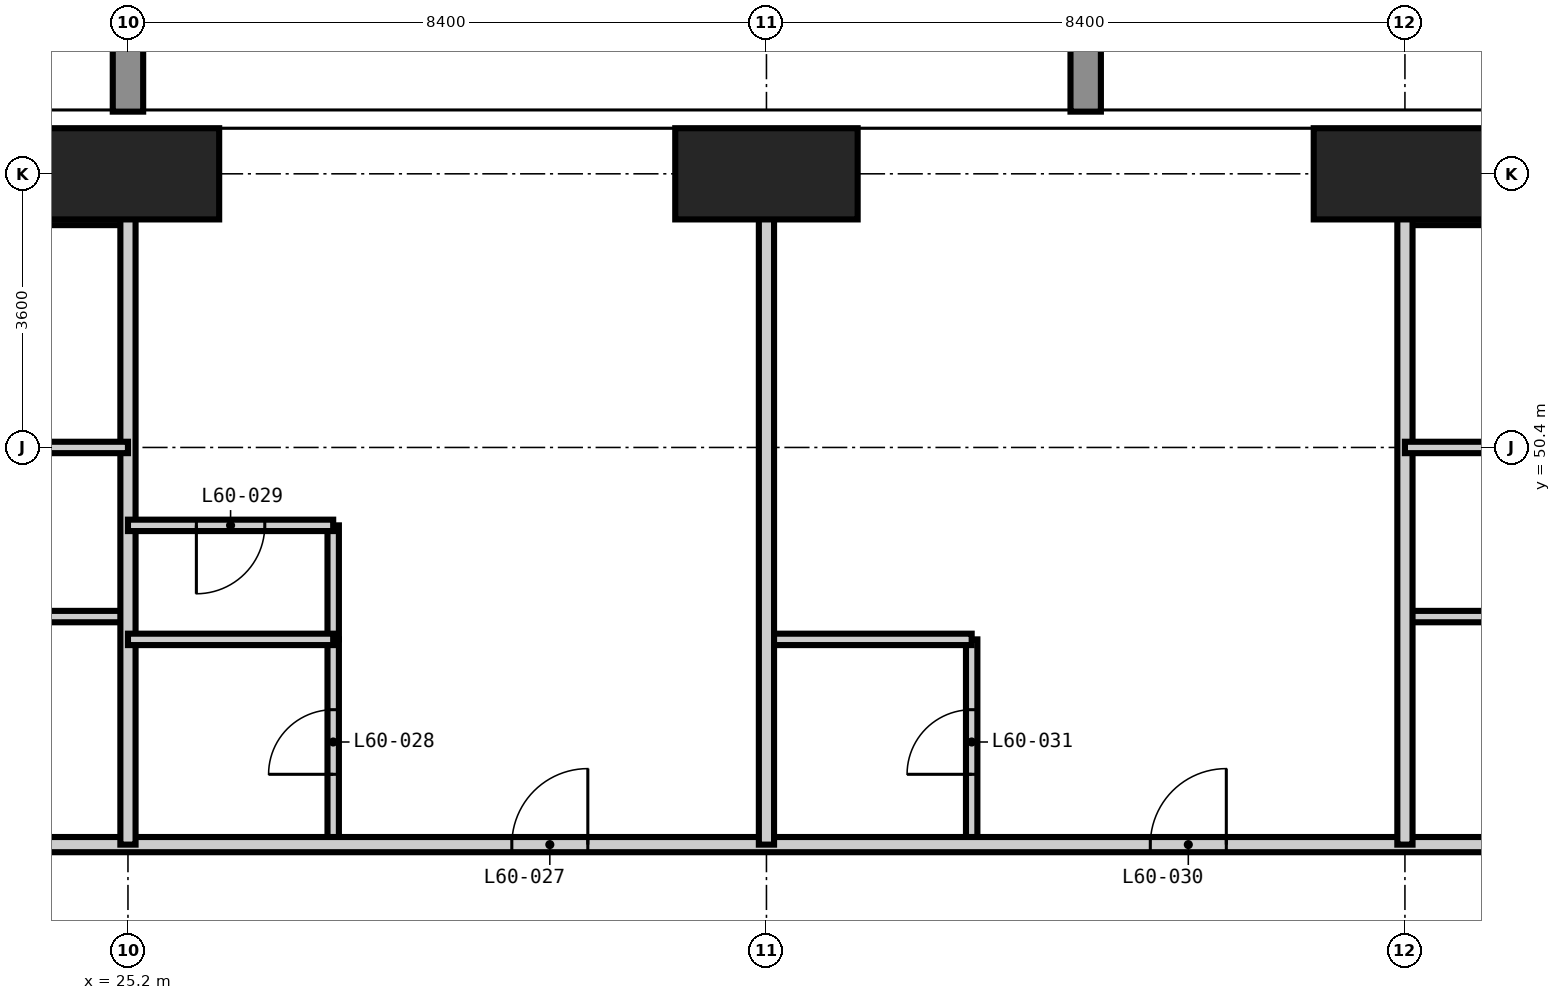
"""IFC4 building model, lengths in metres.
Left out: names, types, materials, properties, quantities, classifications, styles, units other than length and angle.
Written with IfcOpenShell. Run it as: python <this file> out.ifc"""

import sys

from ifc_helpers import new_model, si_unit, direction, frame, frame_2d, origin, origin_2d, place, context, subcontext, project, spatial, rectangle, extrude, element, fill, save


model = new_model("IFC4")
c1 = context("Model", 3, precision=1e-05, world=origin(), true_north=direction((0.0, 1.0)))
c2 = subcontext(c1, "Body", "Model", "MODEL_VIEW")
j1 = project(units=[si_unit("LENGTHUNIT", "METRE"), si_unit("PLANEANGLEUNIT", "RADIAN")], contexts=[c1])
p1 = place(None, origin())
s1 = spatial("IfcSite", under=j1, at=p1, CompositionType="ELEMENT")
p2 = place(p1, origin())
s2 = spatial("IfcBuilding", under=s1, at=p2, CompositionType="ELEMENT")
p3 = place(p2, frame((0.0, 0.0, 233.4)))
s3 = spatial("IfcBuildingStorey", under=s2, at=p3, CompositionType="ELEMENT", Elevation=233.4)
for number, where, z_axis, x_axis in (
    (1, (25.2, 54.0, -0.35), (0.0, 0.0, 1.0), (1.0, 0.0, 0.0)),
    (2, (33.6, 54.0, -0.35), (0.0, 0.0, 1.0), (1.0, 0.0, 0.0)),
    (3, (42.0, 54.0, -0.35), (0.0, 0.0, 1.0), (1.0, 0.0, 0.0)),
):
    element("IfcColumn", number, at=place(p3, frame(where, z_axis=z_axis, x_axis=x_axis)), inside=s3, PredefinedType="COLUMN", context=c2, shape_type="SweptSolid", body=[
        extrude(rectangle(XDim=2.4, YDim=1.2, at=origin_2d()), origin(), (0.0, 0.0, 1.0), 3.9),
    ])
p4 = place(p3, frame((27.9, 45.175, 0.0), z_axis=(0.0, 0.0, 1.0), x_axis=(0.0, 1.0, 0.0)))
e4 = element("IfcWall", 4, at=p4, inside=s3, PredefinedType="PARTITIONING", context=c2, shape_type="SweptSolid", body=[
    extrude(rectangle(XDim=2.7, YDim=0.15, at=frame_2d((1.35, 0.0))), origin(), (0.0, 0.0, 1.0), 3.55),
])
p5 = place(p4, frame((0.925, 0.0, 0.0)))
e5 = element("IfcOpeningElement", 5, at=p5, cuts=e4, PredefinedType="OPENING", context=c2, shape_type="SweptSolid", body=[
    extrude(rectangle(XDim=0.85, YDim=2.1, at=frame_2d((0.425, 1.05))), frame((0.0, 0.085, 0.0), z_axis=(0.0, -1.0, 0.0), x_axis=(1.0, 0.0, 0.0)), (0.0, 0.0, 1.0), 0.17),
])
p6 = place(p3, frame((36.3, 45.175, 0.0), z_axis=(0.0, 0.0, 1.0), x_axis=(0.0, 1.0, 0.0)))
e6 = element("IfcWall", 6, at=p6, inside=s3, PredefinedType="PARTITIONING", context=c2, shape_type="SweptSolid", body=[
    extrude(rectangle(XDim=2.7, YDim=0.15, at=frame_2d((1.35, 0.0))), origin(), (0.0, 0.0, 1.0), 3.55),
])
p7 = place(p6, frame((0.925, 0.0, 0.0)))
e7 = element("IfcOpeningElement", 7, at=p7, cuts=e6, PredefinedType="OPENING", context=c2, shape_type="SweptSolid", body=[
    extrude(rectangle(XDim=0.85, YDim=2.1, at=frame_2d((0.425, 1.05))), frame((0.0, 0.085, 0.0), z_axis=(0.0, -1.0, 0.0), x_axis=(1.0, 0.0, 0.0)), (0.0, 0.0, 1.0), 0.17),
])
p8 = place(p3, frame((33.6, 47.875, 0.0), z_axis=(0.0, 0.0, 1.0), x_axis=(1.0, 0.0, 0.0)))
e8 = element("IfcWall", 8, at=p8, inside=s3, PredefinedType="PARTITIONING", context=c2, shape_type="SweptSolid", body=[
    extrude(rectangle(XDim=2.7, YDim=0.15, at=frame_2d((1.35, 0.0))), origin(), (0.0, 0.0, 1.0), 3.55),
])
p9 = place(p3, frame((22.625, 48.175, 0.0), z_axis=(0.0, 0.0, 1.0), x_axis=(1.0, 0.0, 0.0)))
e9 = element("IfcWall", 9, at=p9, inside=s3, PredefinedType="PARTITIONING", context=c2, shape_type="SweptSolid", body=[
    extrude(rectangle(XDim=2.575, YDim=0.15, at=frame_2d((1.288, 0.0))), origin(), (0.0, 0.0, 1.0), 3.55),
])
p10 = place(p3, frame((42.0, 48.175, 0.0), z_axis=(0.0, 0.0, 1.0), x_axis=(1.0, 0.0, 0.0)))
e10 = element("IfcWall", 10, at=p10, inside=s3, PredefinedType="PARTITIONING", context=c2, shape_type="SweptSolid", body=[
    extrude(rectangle(XDim=2.875, YDim=0.15, at=frame_2d((1.438, 0.0))), origin(), (0.0, 0.0, 1.0), 3.55),
])
p11 = place(p3, frame((21.6, 53.4, 0.0), z_axis=(0.0, 0.0, 1.0), x_axis=(1.0, 0.0, 0.0)))
e11 = element("IfcWall", 11, at=p11, inside=s3, PredefinedType="PARTITIONING", context=c2, shape_type="SweptSolid", body=[
    extrude(rectangle(XDim=3.6, YDim=0.15, at=frame_2d((1.8, 0.0))), origin(), (0.0, 0.0, 1.0), 3.55),
])
p12 = place(p11, frame((1.375, 0.0, 0.0)))
e12 = element("IfcOpeningElement", 12, at=p12, cuts=e11, PredefinedType="OPENING", context=c2, shape_type="SweptSolid", body=[
    extrude(rectangle(XDim=0.85, YDim=2.1, at=frame_2d((0.425, 1.05))), frame((0.0, 0.085, 0.0), z_axis=(0.0, -1.0, 0.0), x_axis=(1.0, 0.0, 0.0)), (0.0, 0.0, 1.0), 0.17),
])
p13 = place(p3, frame((42.0, 53.4, 0.0), z_axis=(0.0, 0.0, 1.0), x_axis=(1.0, 0.0, 0.0)))
e13 = element("IfcWall", 13, at=p13, inside=s3, PredefinedType="PARTITIONING", context=c2, shape_type="SweptSolid", body=[
    extrude(rectangle(XDim=3.6, YDim=0.15, at=frame_2d((1.8, 0.0))), origin(), (0.0, 0.0, 1.0), 3.55),
])
p14 = place(p13, frame((1.375, 0.0, 0.0)))
e14 = element("IfcOpeningElement", 14, at=p14, cuts=e13, PredefinedType="OPENING", context=c2, shape_type="SweptSolid", body=[
    extrude(rectangle(XDim=0.85, YDim=2.1, at=frame_2d((0.425, 1.05))), frame((0.0, 0.085, 0.0), z_axis=(0.0, -1.0, 0.0), x_axis=(1.0, 0.0, 0.0)), (0.0, 0.0, 1.0), 0.17),
])
p15 = place(p3, frame((22.625, 45.175, 0.0), z_axis=(0.0, 0.0, 1.0), x_axis=(1.0, 0.0, 0.0)))
e15 = element("IfcWall", 15, at=p15, inside=s3, PredefinedType="PARTITIONING", context=c2, shape_type="SweptSolid", body=[
    extrude(rectangle(XDim=22.25, YDim=0.2, at=frame_2d((11.125, 0.0))), origin(), (0.0, 0.0, 1.0), 3.55),
])
p16 = place(p15, frame((7.625, 0.0, 0.0)))
e16 = element("IfcOpeningElement", 16, at=p16, cuts=e15, PredefinedType="OPENING", context=c2, shape_type="SweptSolid", body=[
    extrude(rectangle(XDim=1.0, YDim=2.2, at=frame_2d((0.5, 1.1))), frame((0.0, 0.11, 0.0), z_axis=(0.0, -1.0, 0.0), x_axis=(1.0, 0.0, 0.0)), (0.0, 0.0, 1.0), 0.22),
])
p17 = place(p15, frame((16.025, 0.0, 0.0)))
e17 = element("IfcOpeningElement", 17, at=p17, cuts=e15, PredefinedType="OPENING", context=c2, shape_type="SweptSolid", body=[
    extrude(rectangle(XDim=1.0, YDim=2.2, at=frame_2d((0.5, 1.1))), frame((0.0, 0.11, 0.0), z_axis=(0.0, -1.0, 0.0), x_axis=(1.0, 0.0, 0.0)), (0.0, 0.0, 1.0), 0.22),
])
for number, where, z_axis, x_axis in (
    (18, (25.2, 45.175, 0.0), (0.0, 0.0, 1.0), (0.0, 1.0, 0.0)),
    (19, (33.6, 45.175, 0.0), (0.0, 0.0, 1.0), (0.0, 1.0, 0.0)),
    (20, (42.0, 45.175, 0.0), (0.0, 0.0, 1.0), (0.0, 1.0, 0.0)),
):
    element("IfcWall", number, at=place(p3, frame(where, z_axis=z_axis, x_axis=x_axis)), inside=s3, PredefinedType="PARTITIONING", context=c2, shape_type="SweptSolid", body=[
        extrude(rectangle(XDim=9.443, YDim=0.2, at=frame_2d((4.721, 0.0))), origin(), (0.0, 0.0, 1.0), 3.55),
    ])
p18 = place(p3, frame((27.9, 47.875, 0.0), z_axis=(0.0, 0.0, 1.0), x_axis=(0.0, 1.0, 0.0)))
e21 = element("IfcWall", 21, at=p18, inside=s3, PredefinedType="PARTITIONING", context=c2, shape_type="SweptSolid", body=[
    extrude(rectangle(XDim=1.5, YDim=0.15, at=frame_2d((0.75, 0.0))), origin(), (0.0, 0.0, 1.0), 3.55),
])
p19 = place(p3, frame((25.2, 47.875, 0.0), z_axis=(0.0, 0.0, 1.0), x_axis=(1.0, 0.0, 0.0)))
e22 = element("IfcWall", 22, at=p19, inside=s3, PredefinedType="PARTITIONING", context=c2, shape_type="SweptSolid", body=[
    extrude(rectangle(XDim=2.7, YDim=0.15, at=frame_2d((1.35, 0.0))), origin(), (0.0, 0.0, 1.0), 3.55),
])
p20 = place(p3, frame((25.2, 49.375, 0.0), z_axis=(0.0, 0.0, 1.0), x_axis=(1.0, 0.0, 0.0)))
e23 = element("IfcWall", 23, at=p20, inside=s3, PredefinedType="PARTITIONING", context=c2, shape_type="SweptSolid", body=[
    extrude(rectangle(XDim=2.7, YDim=0.15, at=frame_2d((1.35, 0.0))), origin(), (0.0, 0.0, 1.0), 3.55),
])
p21 = place(p20, frame((0.9, 0.0, 0.0)))
e24 = element("IfcOpeningElement", 24, at=p21, cuts=e23, PredefinedType="OPENING", context=c2, shape_type="SweptSolid", body=[
    extrude(rectangle(XDim=0.9, YDim=2.1, at=frame_2d((0.45, 1.05))), frame((0.0, 0.085, 0.0), z_axis=(0.0, -1.0, 0.0), x_axis=(1.0, 0.0, 0.0)), (0.0, 0.0, 1.0), 0.17),
])
p22 = place(p3, frame((12.582, 50.4, 0.0), z_axis=(0.0, 0.0, 1.0), x_axis=(1.0, 0.0, 0.0)))
e25 = element("IfcWall", 25, at=p22, inside=s3, PredefinedType="PARTITIONING", context=c2, shape_type="SweptSolid", body=[
    extrude(rectangle(XDim=12.618, YDim=0.15, at=frame_2d((6.309, 0.0))), origin(), (0.0, 0.0, 1.0), 3.55),
])
p23 = place(p22, frame((2.868, 0.0, 0.0)))
e26 = element("IfcOpeningElement", 26, at=p23, cuts=e25, PredefinedType="OPENING", context=c2, shape_type="SweptSolid", body=[
    extrude(rectangle(XDim=0.9, YDim=2.1, at=frame_2d((0.45, 1.05))), frame((0.0, 0.085, 0.0), z_axis=(0.0, -1.0, 0.0), x_axis=(1.0, 0.0, 0.0)), (0.0, 0.0, 1.0), 0.17),
])
p24 = place(p3, frame((42.0, 50.4, 0.0), z_axis=(0.0, 0.0, 1.0), x_axis=(1.0, 0.0, 0.0)))
e27 = element("IfcWall", 27, at=p24, inside=s3, PredefinedType="PARTITIONING", context=c2, shape_type="SweptSolid", body=[
    extrude(rectangle(XDim=12.618, YDim=0.15, at=frame_2d((6.309, 0.0))), origin(), (0.0, 0.0, 1.0), 3.55),
])
p25 = place(p24, frame((8.85, 0.0, 0.0)))
e28 = element("IfcOpeningElement", 28, at=p25, cuts=e27, PredefinedType="OPENING", context=c2, shape_type="SweptSolid", body=[
    extrude(rectangle(XDim=0.9, YDim=2.1, at=frame_2d((0.45, 1.05))), frame((0.0, 0.085, 0.0), z_axis=(0.0, -1.0, 0.0), x_axis=(1.0, 0.0, 0.0)), (0.0, 0.0, 1.0), 0.17),
])
p26 = place(p16, origin())
e29 = element("IfcDoor", 29, at=p26, inside=s3, OperationType="SINGLE_SWING_RIGHT", PredefinedType="DOOR", context=c2, shape_type="SweptSolid", body=[
    extrude(rectangle(XDim=1.0, YDim=2.2, at=frame_2d((0.5, 1.1))), frame((0.0, 0.025, 0.0), z_axis=(0.0, -1.0, 0.0), x_axis=(1.0, 0.0, 0.0)), (0.0, 0.0, 1.0), 0.05),
])
fill(e16, e29)
p27 = place(p5, origin())
e30 = element("IfcDoor", 30, at=p27, inside=s3, OperationType="SINGLE_SWING_LEFT", PredefinedType="DOOR", context=c2, shape_type="SweptSolid", body=[
    extrude(rectangle(XDim=0.85, YDim=2.1, at=frame_2d((0.425, 1.05))), frame((0.0, 0.025, 0.0), z_axis=(0.0, -1.0, 0.0), x_axis=(1.0, 0.0, 0.0)), (0.0, 0.0, 1.0), 0.05),
])
fill(e5, e30)
p28 = place(p21, frame((0.9, 0.0, 0.0), z_axis=(0.0, 0.0, 1.0), x_axis=(-1.0, 0.0, 0.0)))
e31 = element("IfcDoor", 31, at=p28, inside=s3, OperationType="SINGLE_SWING_RIGHT", PredefinedType="DOOR", context=c2, shape_type="SweptSolid", body=[
    extrude(rectangle(XDim=0.9, YDim=2.1, at=frame_2d((0.45, 1.05))), frame((0.0, 0.025, 0.0), z_axis=(0.0, -1.0, 0.0), x_axis=(1.0, 0.0, 0.0)), (0.0, 0.0, 1.0), 0.05),
])
fill(e24, e31)
p29 = place(p17, origin())
e32 = element("IfcDoor", 32, at=p29, inside=s3, OperationType="SINGLE_SWING_RIGHT", PredefinedType="DOOR", context=c2, shape_type="SweptSolid", body=[
    extrude(rectangle(XDim=1.0, YDim=2.2, at=frame_2d((0.5, 1.1))), frame((0.0, 0.025, 0.0), z_axis=(0.0, -1.0, 0.0), x_axis=(1.0, 0.0, 0.0)), (0.0, 0.0, 1.0), 0.05),
])
fill(e17, e32)
p30 = place(p7, origin())
e33 = element("IfcDoor", 33, at=p30, inside=s3, OperationType="SINGLE_SWING_LEFT", PredefinedType="DOOR", context=c2, shape_type="SweptSolid", body=[
    extrude(rectangle(XDim=0.85, YDim=2.1, at=frame_2d((0.425, 1.05))), frame((0.0, 0.025, 0.0), z_axis=(0.0, -1.0, 0.0), x_axis=(1.0, 0.0, 0.0)), (0.0, 0.0, 1.0), 0.05),
])
fill(e7, e33)
save(model, sys.argv[1])
